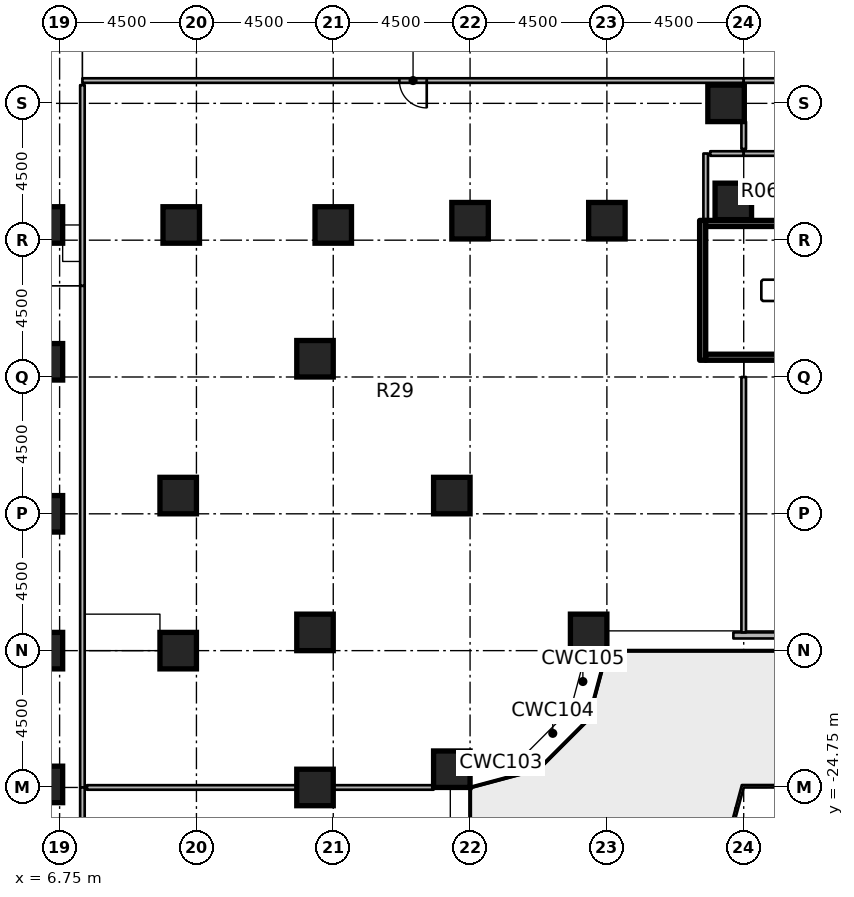
"""IFC4 building model, lengths in metres.
Left out: names, types, materials, properties, quantities, classifications, styles, units other than length and angle.
Written with IfcOpenShell. Run it as: python <this file> out.ifc"""

import sys

from ifc_helpers import new_model, si_unit, direction, frame, frame_2d, origin, origin_2d, place, context, subcontext, project, spatial, rectangle, extrude, element, fill, save


model = new_model("IFC4")
c1 = context("Model", 3, precision=1e-05, world=origin(), true_north=direction((0.0, 1.0)))
c2 = subcontext(c1, "Body", "Model", "MODEL_VIEW")
j1 = project(units=[si_unit("LENGTHUNIT", "METRE"), si_unit("PLANEANGLEUNIT", "RADIAN")], contexts=[c1])
p1 = place(None, origin())
s1 = spatial("IfcSite", under=j1, at=p1, CompositionType="ELEMENT")
p2 = place(p1, origin())
s2 = spatial("IfcBuilding", under=s1, at=p2, CompositionType="ELEMENT")
p3 = place(p2, frame((0.0, 0.0, 12.0)))
s3 = spatial("IfcBuildingStorey", under=s2, at=p3, CompositionType="ELEMENT", Elevation=12.0)
for number, where, z_axis, x_axis in (
    (1, (6.25, -24.65, 0.0), (0.0, 0.0, 1.0), (1.0, 0.0, 0.0)),
    (2, (6.25, -20.25, 0.0), (0.0, 0.0, 1.0), (1.0, 0.0, 0.0)),
    (3, (6.25, -15.75, 0.0), (0.0, 0.0, 1.0), (1.0, 0.0, 0.0)),
    (4, (6.25, -10.75, 0.0), (0.0, 0.0, 1.0), (1.0, 0.0, 0.0)),
    (5, (6.25, -6.25, 0.0), (0.0, 0.0, 1.0), (1.0, 0.0, 0.0)),
    (6, (10.65, -20.25, 0.0), (0.0, 0.0, 1.0), (1.0, 0.0, 0.0)),
    (7, (10.65, -15.15, 0.0), (0.0, 0.0, 1.0), (1.0, 0.0, 0.0)),
    (8, (10.75, -6.25, 0.0), (0.0, 0.0, 1.0), (1.0, 0.0, 0.0)),
    (9, (15.15, -24.75, 0.0), (0.0, 0.0, 1.0), (1.0, 0.0, 0.0)),
    (10, (15.15, -19.65, 0.0), (0.0, 0.0, 1.0), (1.0, 0.0, 0.0)),
    (11, (15.15, -10.65, 0.0), (0.0, 0.0, 1.0), (1.0, 0.0, 0.0)),
    (12, (15.75, -6.25, 0.0), (0.0, 0.0, 1.0), (1.0, 0.0, 0.0)),
    (13, (19.65, -24.15, 0.0), (0.0, 0.0, 1.0), (1.0, 0.0, 0.0)),
    (14, (19.65, -15.15, 0.0), (0.0, 0.0, 1.0), (1.0, 0.0, 0.0)),
    (15, (20.25, -6.11, 0.0), (0.0, 0.0, 1.0), (1.0, 0.0, 0.0)),
    (16, (24.15, -19.65, 0.0), (0.0, 0.0, 1.0), (1.0, 0.0, 0.0)),
    (17, (24.75, -6.11, 0.0), (0.0, 0.0, 1.0), (1.0, 0.0, 0.0)),
    (18, (28.908, -5.475, 0.0), (0.0, 0.0, 1.0), (1.0, 0.0, 0.0)),
    (19, (28.67, -2.25, 0.0), (0.0, 0.0, 1.0), (1.0, 0.0, 0.0)),
):
    element("IfcColumn", number, at=place(p3, frame(where, z_axis=z_axis, x_axis=x_axis)), inside=s3, PredefinedType="COLUMN", context=c2, shape_type="SweptSolid", body=[
        extrude(rectangle(XDim=1.2, YDim=1.2, at=origin_2d()), origin(), (0.0, 0.0, 1.0), 4.55),
    ])
p4 = place(p3, frame((28.91, -19.75, 0.0), z_axis=(0.0, 0.0, 1.0), x_axis=(1.0, 0.0, 0.0)))
e20 = element("IfcWall", 20, at=p4, inside=s3, PredefinedType="SOLIDWALL", context=c2, shape_type="SweptSolid", body=[
    extrude(rectangle(XDim=4.58, YDim=0.2, at=frame_2d((2.29, 0.0))), origin(), (0.0, 0.0, 1.0), 4.55),
])
p5 = place(p4, frame((1.39, 0.0, 0.0)))
e21 = element("IfcOpeningElement", 21, at=p5, cuts=e20, PredefinedType="OPENING", context=c2, shape_type="SweptSolid", body=[
    extrude(rectangle(XDim=1.8, YDim=2.4, at=frame_2d((0.9, 1.2))), frame((0.0, 0.11, 0.0), z_axis=(0.0, -1.0, 0.0), x_axis=(1.0, 0.0, 0.0)), (0.0, 0.0, 1.0), 0.22),
])
p6 = place(p3, frame((27.9, -10.7, 0.0), z_axis=(0.0, 0.0, 1.0), x_axis=(0.0, 1.0, 0.0)))
e22 = element("IfcWall", 22, at=p6, inside=s3, PredefinedType="SHEAR", context=c2, shape_type="SweptSolid", body=[
    extrude(rectangle(XDim=4.6, YDim=0.2, at=frame_2d((2.3, 0.0))), origin(), (0.0, 0.0, 1.0), 4.55),
])
p7 = place(p3, frame((28.0, -10.6, 0.0), z_axis=(0.0, 0.0, 1.0), x_axis=(1.0, 0.0, 0.0)))
e23 = element("IfcWall", 23, at=p7, inside=s3, PredefinedType="SHEAR", context=c2, shape_type="SweptSolid", body=[
    extrude(rectangle(XDim=7.6, YDim=0.2, at=frame_2d((3.8, 0.0))), origin(), (0.0, 0.0, 1.0), 4.55),
])
p8 = place(p3, frame((28.0, -6.2, 0.0), z_axis=(0.0, 0.0, 1.0), x_axis=(1.0, 0.0, 0.0)))
e24 = element("IfcWall", 24, at=p8, inside=s3, PredefinedType="SHEAR", context=c2, shape_type="SweptSolid", body=[
    extrude(rectangle(XDim=7.6, YDim=0.2, at=frame_2d((3.8, 0.0))), origin(), (0.0, 0.0, 1.0), 4.55),
])
p9 = place(p8, frame((6.1, 0.0, 0.0)))
e25 = element("IfcOpeningElement", 25, at=p9, cuts=e24, PredefinedType="OPENING", context=c2, shape_type="SweptSolid", body=[
    extrude(rectangle(XDim=1.2, YDim=2.1, at=frame_2d((0.6, 1.05))), frame((0.0, 0.11, 0.0), z_axis=(0.0, -1.0, 0.0), x_axis=(1.0, 0.0, 0.0)), (0.0, 0.0, 1.0), 0.22),
])
p10 = place(p3, frame((28.0, -6.1, 0.0), z_axis=(0.0, 0.0, 1.0), x_axis=(0.0, 1.0, 0.0)))
e26 = element("IfcWall", 26, at=p10, inside=s3, PredefinedType="PARTITIONING", context=c2, shape_type="SweptSolid", body=[
    extrude(rectangle(XDim=2.2, YDim=0.15, at=frame_2d((1.1, 0.0))), origin(), (0.0, 0.0, 1.0), 4.55),
])
p11 = place(p3, frame((28.15, -3.9, 0.0), z_axis=(0.0, 0.0, 1.0), x_axis=(1.0, 0.0, 0.0)))
e27 = element("IfcWall", 27, at=p11, inside=s3, PredefinedType="PARTITIONING", context=c2, shape_type="SweptSolid", body=[
    extrude(rectangle(XDim=1.1, YDim=0.15, at=frame_2d((0.55, 0.0))), origin(), (0.0, 0.0, 1.0), 4.55),
])
p12 = place(p3, frame((29.25, -3.9, 0.0), z_axis=(0.0, 0.0, 1.0), x_axis=(1.0, 0.0, 0.0)))
e28 = element("IfcWall", 28, at=p12, inside=s3, PredefinedType="PARTITIONING", context=c2, shape_type="SweptSolid", body=[
    extrude(rectangle(XDim=6.35, YDim=0.15, at=frame_2d((3.175, 0.0))), origin(), (0.0, 0.0, 1.0), 4.55),
])
p13 = place(p3, frame((7.5, -8.25, 0.0), z_axis=(0.0, 0.0, 1.0), x_axis=(0.0, -1.0, 0.0)))
e29 = element("IfcWall", 29, at=p13, inside=s3, PredefinedType="PARTITIONING", context=c2, shape_type="SweptSolid", body=[
    extrude(rectangle(XDim=16.5, YDim=0.15, at=frame_2d((8.25, 0.0))), origin(), (0.0, 0.0, 1.0), 4.55),
])
p14 = place(p3, frame((7.5, -24.75, 0.0), z_axis=(0.0, 0.0, 1.0), x_axis=(0.0, -1.0, 0.0)))
e30 = element("IfcWall", 30, at=p14, inside=s3, PredefinedType="PARTITIONING", context=c2, shape_type="SweptSolid", body=[
    extrude(rectangle(XDim=7.5, YDim=0.15, at=frame_2d((3.75, 0.0))), origin(), (0.0, 0.0, 1.0), 4.55),
])
p15 = place(p3, frame((29.25, -1.5, 0.0), z_axis=(0.0, 0.0, 1.0), x_axis=(-1.0, 0.0, 0.0)))
e31 = element("IfcWall", 31, at=p15, inside=s3, PredefinedType="PARTITIONING", context=c2, shape_type="SweptSolid", body=[
    extrude(rectangle(XDim=21.75, YDim=0.15, at=frame_2d((10.875, 0.0))), origin(), (0.0, 0.0, 1.0), 4.55),
])
p16 = place(p15, frame((10.425, 0.0, 0.0)))
e32 = element("IfcOpeningElement", 32, at=p16, cuts=e31, PredefinedType="OPENING", context=c2, shape_type="SweptSolid", body=[
    extrude(rectangle(XDim=0.9, YDim=2.1, at=frame_2d((0.45, 1.05))), frame((0.0, 0.085, 0.0), z_axis=(0.0, -1.0, 0.0), x_axis=(1.0, 0.0, 0.0)), (0.0, 0.0, 1.0), 0.17),
])
p17 = place(p3, frame((46.65, -1.5, 0.0), z_axis=(0.0, 0.0, 1.0), x_axis=(-1.0, 0.0, 0.0)))
e33 = element("IfcWall", 33, at=p17, inside=s3, PredefinedType="PARTITIONING", context=c2, shape_type="SweptSolid", body=[
    extrude(rectangle(XDim=17.4, YDim=0.15, at=frame_2d((8.7, 0.0))), origin(), (0.0, 0.0, 1.0), 4.55),
])
p18 = place(p17, frame((7.95, 0.0, 0.0)))
e34 = element("IfcOpeningElement", 34, at=p18, cuts=e33, PredefinedType="OPENING", context=c2, shape_type="SweptSolid", body=[
    extrude(rectangle(XDim=0.9, YDim=2.1, at=frame_2d((0.45, 1.05))), frame((0.0, 0.085, 0.0), z_axis=(0.0, -1.0, 0.0), x_axis=(1.0, 0.0, 0.0)), (0.0, 0.0, 1.0), 0.17),
])
p19 = place(p3, frame((29.25, -11.25, 0.0), z_axis=(0.0, 0.0, 1.0), x_axis=(0.0, -1.0, 0.0)))
e35 = element("IfcWall", 35, at=p19, inside=s3, PredefinedType="PARTITIONING", context=c2, shape_type="SweptSolid", body=[
    extrude(rectangle(XDim=8.4, YDim=0.15, at=frame_2d((4.2, 0.0))), origin(), (0.0, 0.0, 1.0), 4.55),
])
p20 = place(p3, frame((29.25, -2.85, 0.0), z_axis=(0.0, 0.0, 1.0), x_axis=(0.0, -1.0, 0.0)))
e36 = element("IfcWall", 36, at=p20, inside=s3, PredefinedType="PARTITIONING", context=c2, shape_type="SweptSolid", body=[
    extrude(rectangle(XDim=0.9, YDim=0.15, at=frame_2d((0.45, 0.0))), origin(), (0.0, 0.0, 1.0), 4.55),
])
p21 = place(p3, frame((19.05, -24.75, 0.0), z_axis=(0.0, 0.0, 1.0), x_axis=(-1.0, 0.0, 0.0)))
e37 = element("IfcWall", 37, at=p21, inside=s3, PredefinedType="PARTITIONING", context=c2, shape_type="SweptSolid", body=[
    extrude(rectangle(XDim=3.3, YDim=0.15, at=frame_2d((1.65, 0.0))), origin(), (0.0, 0.0, 1.0), 4.55),
])
p22 = place(p3, frame((14.55, -24.75, 0.0), z_axis=(0.0, 0.0, 1.0), x_axis=(-1.0, 0.0, 0.0)))
e38 = element("IfcWall", 38, at=p22, inside=s3, PredefinedType="PARTITIONING", context=c2, shape_type="SweptSolid", body=[
    extrude(rectangle(XDim=6.9, YDim=0.15, at=frame_2d((3.45, 0.0))), origin(), (0.0, 0.0, 1.0), 4.55),
])
p23 = place(p3, frame((7.5, -8.25, 0.0), z_axis=(0.0, 0.0, 1.0), x_axis=(0.0, 1.0, 0.0)))
e39 = element("IfcWall", 39, at=p23, inside=s3, PredefinedType="PARTITIONING", context=c2, shape_type="SweptSolid", body=[
    extrude(rectangle(XDim=6.6, YDim=0.15, at=frame_2d((3.3, 0.0))), origin(), (0.0, 0.0, 1.0), 4.55),
])
p24 = place(p16, origin())
e40 = element("IfcDoor", 40, at=p24, inside=s3, OperationType="SINGLE_SWING_LEFT", PredefinedType="DOOR", context=c2, shape_type="SweptSolid", body=[
    extrude(rectangle(XDim=0.9, YDim=2.1, at=frame_2d((0.45, 1.05))), frame((0.0, 0.025, 0.0), z_axis=(0.0, -1.0, 0.0), x_axis=(1.0, 0.0, 0.0)), (0.0, 0.0, 1.0), 0.05),
])
fill(e32, e40)
save(model, sys.argv[1])
